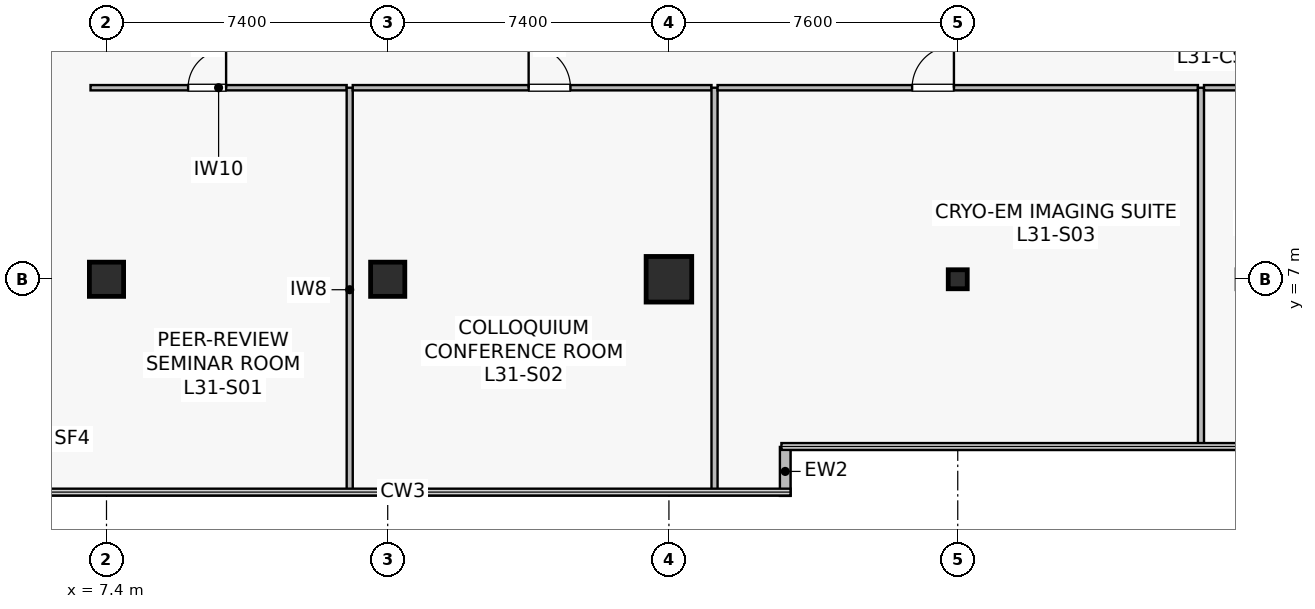
"""IFC4 building model, lengths in metres.
Left out: names, types, materials, properties, quantities, classifications, styles, units other than length and angle.
Written with IfcOpenShell. Run it as: python <this file> out.ifc"""

import sys

from ifc_helpers import new_model, si_unit, direction, frame, frame_2d, origin, origin_2d, place, context, subcontext, project, spatial, rectangle, hollow_rectangle, extrude, source, transform, mapped, element, fill, save


model = new_model("IFC4")
c1 = context("Model", 3, precision=1e-05, world=origin(), true_north=direction((0.0, 1.0)))
c2 = subcontext(c1, "Body", "Model", "MODEL_VIEW")
j1 = project(units=[si_unit("LENGTHUNIT", "METRE"), si_unit("PLANEANGLEUNIT", "RADIAN")], contexts=[c1])
p1 = place(None, origin())
s1 = spatial("IfcSite", under=j1, at=p1, CompositionType="ELEMENT")
p2 = place(p1, origin())
s2 = spatial("IfcBuilding", under=s1, at=p2, CompositionType="ELEMENT")
p3 = place(p2, frame((0.0, 0.0, 129.7)))
s3 = spatial("IfcBuildingStorey", under=s2, at=p3, CompositionType="ELEMENT", Elevation=129.7)
m1 = source(origin(), c2, "Body", "SweptSolid", [
    extrude(rectangle(XDim=0.9, YDim=0.9, at=origin_2d()), origin(), (0.0, 0.0, 1.0), 4.1),
])
p4 = place(p3, frame((14.8, 7.0, 0.0), z_axis=(0.0, 0.0, 1.0), x_axis=(1.0, 0.0, 0.0)))
e1 = element("IfcColumn", 1, at=p4, inside=s3, PredefinedType="COLUMN", context=c2, shape_type="MappedRepresentation", body=[
    mapped(m1, transform((0.0, 0.0, 0.0), scale=1.0)),
])
m2 = source(origin(), c2, "Body", "SweptSolid", [
    extrude(rectangle(XDim=1.2, YDim=1.2, at=origin_2d()), origin(), (0.0, 0.0, 1.0), 4.1),
])
p5 = place(p3, frame((22.2, 7.0, 0.0), z_axis=(0.0, 0.0, 1.0), x_axis=(1.0, 0.0, 0.0)))
e2 = element("IfcColumn", 2, at=p5, inside=s3, PredefinedType="COLUMN", context=c2, shape_type="MappedRepresentation", body=[
    mapped(m2, transform((0.0, 0.0, 0.0), scale=1.0)),
])
p6 = place(p3, frame((7.4, 7.0, 0.0), z_axis=(0.0, 0.0, 1.0), x_axis=(1.0, 0.0, 0.0)))
e3 = element("IfcColumn", 3, at=p6, inside=s3, PredefinedType="COLUMN", context=c2, shape_type="MappedRepresentation", body=[
    mapped(m1, transform((0.0, 0.0, 0.0), scale=1.0)),
])
m3 = source(origin(), c2, "Body", "SweptSolid", [
    extrude(hollow_rectangle(XDim=0.5, YDim=0.5, WallThickness=0.022, at=origin_2d()), origin(), (0.0, 0.0, 1.0), 4.1),
])
p7 = place(p3, frame((29.8, 7.0, 0.0), z_axis=(0.0, 0.0, 1.0), x_axis=(1.0, 0.0, 0.0)))
e4 = element("IfcColumn", 4, at=p7, inside=s3, PredefinedType="COLUMN", context=c2, shape_type="MappedRepresentation", body=[
    mapped(m3, transform((0.0, 0.0, 0.0), scale=1.0)),
])
p8 = place(p3, frame((25.26, 1.3, 0.0), z_axis=(0.0, 0.0, 1.0), x_axis=(0.0, 1.0, 0.0)))
e5 = element("IfcWall", 5, at=p8, inside=s3, PredefinedType="STANDARD", context=c2, shape_type="SweptSolid", body=[
    extrude(rectangle(XDim=1.288, YDim=0.28, at=frame_2d((0.644, 0.0))), origin(), (0.0, 0.0, 1.0), 3.79),
])
p9 = place(p3, frame((6.98, 12.04, 0.0), z_axis=(0.0, 0.0, 1.0), x_axis=(1.0, 0.0, 0.0)))
e6 = element("IfcWall", 6, at=p9, inside=s3, PredefinedType="PARTITIONING", context=c2, shape_type="SweptSolid", body=[
    extrude(rectangle(XDim=6.74, YDim=0.14, at=frame_2d((3.37, 0.0))), origin(), (0.0, 0.0, 1.0), 3.275),
])
p10 = place(p9, frame((2.568, 0.0, 0.0)))
e7 = element("IfcOpeningElement", 7, at=p10, cuts=e6, PredefinedType="OPENING", context=c2, shape_type="SweptSolid", body=[
    extrude(rectangle(XDim=1.0, YDim=2.15, at=frame_2d((0.5, 1.075))), frame((0.0, 0.08, 0.0), z_axis=(0.0, -1.0, 0.0), x_axis=(1.0, 0.0, 0.0)), (0.0, 0.0, 1.0), 0.16),
])
p11 = place(p3, frame((13.8, 1.41, 0.0), z_axis=(0.0, 0.0, 1.0), x_axis=(0.0, 1.0, 0.0)))
e8 = element("IfcWall", 8, at=p11, inside=s3, PredefinedType="PARTITIONING", context=c2, shape_type="SweptSolid", body=[
    extrude(rectangle(XDim=10.63, YDim=0.16, at=frame_2d((5.315, 0.0))), origin(), (0.0, 0.0, 1.0), 3.075),
])
p12 = place(p3, frame((13.88, 12.04, 0.0), z_axis=(0.0, 0.0, 1.0), x_axis=(1.0, 0.0, 0.0)))
e9 = element("IfcWall", 9, at=p12, inside=s3, PredefinedType="PARTITIONING", context=c2, shape_type="SweptSolid", body=[
    extrude(rectangle(XDim=9.44, YDim=0.14, at=frame_2d((4.72, 0.0))), origin(), (0.0, 0.0, 1.0), 3.125),
])
p13 = place(p12, frame((4.628, 0.0, 0.0)))
e10 = element("IfcOpeningElement", 10, at=p13, cuts=e9, PredefinedType="OPENING", context=c2, shape_type="SweptSolid", body=[
    extrude(rectangle(XDim=1.1, YDim=2.18, at=frame_2d((0.55, 1.09))), frame((0.0, 0.08, 0.0), z_axis=(0.0, -1.0, 0.0), x_axis=(1.0, 0.0, 0.0)), (0.0, 0.0, 1.0), 0.16),
])
p14 = place(p3, frame((23.4, 1.41, 0.0), z_axis=(0.0, 0.0, 1.0), x_axis=(0.0, 1.0, 0.0)))
e11 = element("IfcWall", 11, at=p14, inside=s3, PredefinedType="PARTITIONING", context=c2, shape_type="SweptSolid", body=[
    extrude(rectangle(XDim=10.63, YDim=0.16, at=frame_2d((5.315, 0.0))), origin(), (0.0, 0.0, 1.0), 3.075),
])
p15 = place(p3, frame((23.48, 12.04, 0.0), z_axis=(0.0, 0.0, 1.0), x_axis=(1.0, 0.0, 0.0)))
e12 = element("IfcWall", 12, at=p15, inside=s3, PredefinedType="PARTITIONING", context=c2, shape_type="SweptSolid", body=[
    extrude(rectangle(XDim=12.64, YDim=0.14, at=frame_2d((6.32, 0.0))), origin(), (0.0, 0.0, 1.0), 3.125),
])
p16 = place(p15, frame((5.12, 0.0, 0.0)))
e13 = element("IfcOpeningElement", 13, at=p16, cuts=e12, PredefinedType="OPENING", context=c2, shape_type="SweptSolid", body=[
    extrude(rectangle(XDim=1.1, YDim=2.18, at=frame_2d((0.55, 1.09))), frame((0.0, 0.08, 0.0), z_axis=(0.0, -1.0, 0.0), x_axis=(1.0, 0.0, 0.0)), (0.0, 0.0, 1.0), 0.16),
])
p17 = place(p3, frame((36.2, 2.61, 0.0), z_axis=(0.0, 0.0, 1.0), x_axis=(0.0, 1.0, 0.0)))
e14 = element("IfcWall", 14, at=p17, inside=s3, PredefinedType="PARTITIONING", context=c2, shape_type="SweptSolid", body=[
    extrude(rectangle(XDim=9.43, YDim=0.16, at=frame_2d((4.715, 0.0))), origin(), (0.0, 0.0, 1.0), 3.075),
])
p18 = place(p3, frame((36.28, 12.04, 0.0), z_axis=(0.0, 0.0, 1.0), x_axis=(1.0, 0.0, 0.0)))
e15 = element("IfcWall", 15, at=p18, inside=s3, PredefinedType="PARTITIONING", context=c2, shape_type="SweptSolid", body=[
    extrude(rectangle(XDim=14.64, YDim=0.14, at=frame_2d((7.32, 0.0))), origin(), (0.0, 0.0, 1.0), 3.125),
])
p19 = place(p18, frame((7.54, 0.0, 0.0)))
e16 = element("IfcOpeningElement", 16, at=p19, cuts=e15, PredefinedType="OPENING", context=c2, shape_type="SweptSolid", body=[
    extrude(rectangle(XDim=1.1, YDim=2.18, at=frame_2d((0.55, 1.09))), frame((0.0, 0.08, 0.0), z_axis=(0.0, -1.0, 0.0), x_axis=(1.0, 0.0, 0.0)), (0.0, 0.0, 1.0), 0.16),
])
m4 = source(origin(), c2, "Body", "SweptSolid", [
    extrude(rectangle(XDim=1.0, YDim=2.15, at=frame_2d((0.5, 1.075))), frame((0.0, 0.025, 0.0), z_axis=(0.0, -1.0, 0.0), x_axis=(1.0, 0.0, 0.0)), (0.0, 0.0, 1.0), 0.05),
])
p20 = place(p10, origin())
e17 = element("IfcDoor", 17, at=p20, inside=s3, OperationType="SINGLE_SWING_RIGHT", PredefinedType="DOOR", context=c2, shape_type="MappedRepresentation", body=[
    mapped(m4, transform((0.0, 0.0, 0.0), scale=1.0)),
])
fill(e7, e17)
m5 = source(origin(), c2, "Body", "SweptSolid", [
    extrude(rectangle(XDim=1.1, YDim=2.18, at=frame_2d((0.55, 1.09))), frame((0.0, 0.025, 0.0), z_axis=(0.0, -1.0, 0.0), x_axis=(1.0, 0.0, 0.0)), (0.0, 0.0, 1.0), 0.05),
])
p21 = place(p13, origin())
e18 = element("IfcDoor", 18, at=p21, inside=s3, OperationType="SINGLE_SWING_LEFT", PredefinedType="DOOR", context=c2, shape_type="MappedRepresentation", body=[
    mapped(m5, transform((0.0, 0.0, 0.0), scale=1.0)),
])
fill(e10, e18)
p22 = place(p16, origin())
e19 = element("IfcDoor", 19, at=p22, inside=s3, OperationType="SINGLE_SWING_RIGHT", PredefinedType="DOOR", context=c2, shape_type="MappedRepresentation", body=[
    mapped(m5, transform((0.0, 0.0, 0.0), scale=1.0)),
])
fill(e13, e19)
save(model, sys.argv[1])
